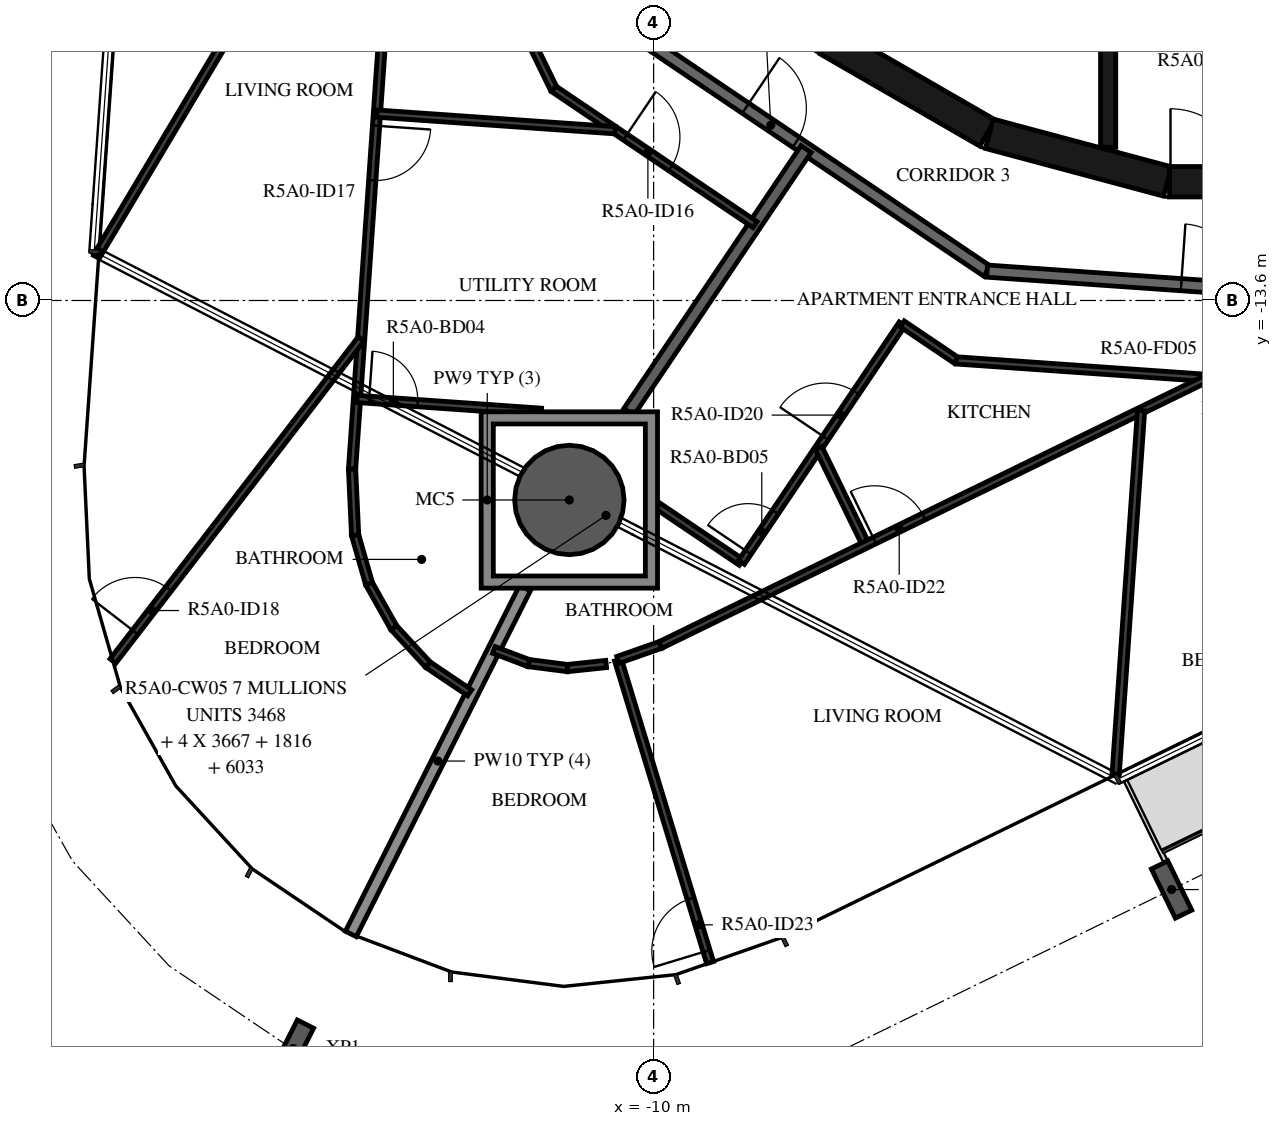
"""IFC4 building model, lengths in metres.
Left out: names, types, materials, properties, quantities, classifications, styles, units other than length and angle.
Written with IfcOpenShell. Run it as: python <this file> out.ifc"""

import sys

from ifc_helpers import new_model, si_unit, direction, frame, frame_2d, origin, origin_2d, place, context, subcontext, project, spatial, polyline, rectangle, hollow_circle, i_section, outline, extrude, element, fill, save


model = new_model("IFC4")
c1 = context("Model", 3, precision=1e-05, world=origin(), true_north=direction((0.0, 1.0)))
c2 = subcontext(c1, "Body", "Model", "MODEL_VIEW")
j1 = project(units=[si_unit("LENGTHUNIT", "METRE"), si_unit("PLANEANGLEUNIT", "RADIAN")], contexts=[c1])
p1 = place(None, origin())
s1 = spatial("IfcSite", under=j1, at=p1, CompositionType="ELEMENT")
p2 = place(p1, origin())
s2 = spatial("IfcBuilding", under=s1, at=p2, CompositionType="ELEMENT")
p3 = place(p2, frame((0.0, 0.0, 195.4)))
s3 = spatial("IfcBuildingStorey", under=s2, at=p3, CompositionType="ELEMENT", Elevation=195.4)
p4 = place(p3, frame((-11.386, -16.881, -0.38), z_axis=(0.0, 0.0, 1.0), x_axis=(1.0, 0.0, 0.0)))
e1 = element("IfcColumn", 1, at=p4, inside=s3, PredefinedType="COLUMN", context=c2, shape_type="SweptSolid", body=[
    extrude(hollow_circle(Radius=0.9, WallThickness=0.04, at=origin_2d()), origin(), (0.0, 0.0, 1.0), 3.5),
])
for number, where, z_axis, x_axis in (
    (2, (-15.928, -25.902, -0.38), (0.0, 0.0, 1.0), (-0.893, 0.45, 0.0)),
    (3, (-1.482, -23.287, -0.38), (0.0, 0.0, 1.0), (-0.899, -0.438, 0.0)),
):
    element("IfcColumn", number, at=place(p3, frame(where, z_axis=z_axis, x_axis=x_axis)), inside=s3, PredefinedType="COLUMN", context=c2, shape_type="SweptSolid", body=[
        extrude(i_section(OverallWidth=0.3, OverallDepth=0.9, WebThickness=0.019, FlangeThickness=0.035, FilletRadius=0.03, at=origin_2d()), origin(), (0.0, 0.0, 1.0), 3.5),
    ])
for number, where, z_axis, x_axis in (
    (4, (-7.137, -9.329, 0.0), (0.0, 0.0, 1.0), (0.866, -0.5, 0.0)),
    (5, (-4.479, -10.858, 0.0), (0.0, 0.0, 1.0), (0.966, -0.259, 0.0)),
):
    element("IfcWall", number, at=place(p3, frame(where, z_axis=z_axis, x_axis=x_axis)), inside=s3, PredefinedType="SHEAR", context=c2, shape_type="SweptSolid", body=[
        extrude(rectangle(XDim=3.033, YDim=0.5, at=frame_2d((1.516, 0.0))), origin(), (0.0, 0.0, 1.0), 3.12),
    ])
p5 = place(p3, frame((-1.516, -11.647, 0.0), z_axis=(0.0, 0.0, 1.0), x_axis=(1.0, 0.0, 0.0)))
e6 = element("IfcWall", 6, at=p5, inside=s3, PredefinedType="SHEAR", context=c2, shape_type="SweptSolid", body=[
    extrude(rectangle(XDim=3.033, YDim=0.5, at=frame_2d((1.516, 0.0))), origin(), (0.0, 0.0, 1.0), 3.12),
])
p6 = place(p5, frame((0.016, 0.0, 0.0)))
e7 = element("IfcOpeningElement", 7, at=p6, cuts=e6, PredefinedType="OPENING", context=c2, shape_type="SweptSolid", body=[
    extrude(rectangle(XDim=1.2, YDim=2.1, at=frame_2d((0.6, 1.05))), frame((0.0, 0.26, 0.0), z_axis=(0.0, -1.0, 0.0), x_axis=(1.0, 0.0, 0.0)), (0.0, 0.0, 1.0), 0.52),
])
p7 = place(p3, frame((-2.525, -8.97, 0.0), z_axis=(0.0, 0.0, 1.0), x_axis=(0.0, -1.0, 0.0)))
e8 = element("IfcWall", 8, at=p7, inside=s3, PredefinedType="SHEAR", context=c2, shape_type="SweptSolid", body=[
    extrude(rectangle(XDim=2.11, YDim=0.25, at=frame_2d((1.055, 0.0))), origin(), (0.0, 0.0, 1.0), 3.12),
])
p8 = place(p3, frame((-10.47, -9.101, 0.0), z_axis=(0.0, 0.0, 1.0), x_axis=(0.829035841718, -0.559195469534, 0.0)))
e9 = element("IfcWall", 9, at=p8, inside=s3, PredefinedType="STANDARD", context=c2, shape_type="SweptSolid", body=[
    extrude(rectangle(XDim=7.181, YDim=0.2, at=frame_2d((3.591, 0.0))), origin(), (0.0, 0.0, 1.0), 3.12),
])
p9 = place(p8, frame((2.39, 0.0, 0.0)))
e10 = element("IfcOpeningElement", 10, at=p9, cuts=e9, PredefinedType="OPENING", context=c2, shape_type="SweptSolid", body=[
    extrude(rectangle(XDim=1.0, YDim=2.1, at=frame_2d((0.5, 1.05))), frame((0.0, 0.11, 0.0), z_axis=(0.0, -1.0, 0.0), x_axis=(1.0, 0.0, 0.0)), (0.0, 0.0, 1.0), 0.22),
])
p10 = place(p3, frame((-4.517, -13.117, 0.0), z_axis=(0.0, 0.0, 1.0), x_axis=(0.997564669554, -0.069747616856, 0.0)))
e11 = element("IfcWall", 11, at=p10, inside=s3, PredefinedType="STANDARD", context=c2, shape_type="SweptSolid", body=[
    extrude(rectangle(XDim=6.885, YDim=0.2, at=frame_2d((3.443, 0.0))), origin(), (0.0, 0.0, 1.0), 3.12),
])
p11 = place(p10, frame((3.2, 0.0, 0.0)))
e12 = element("IfcOpeningElement", 12, at=p11, cuts=e11, PredefinedType="OPENING", context=c2, shape_type="SweptSolid", body=[
    extrude(rectangle(XDim=1.0, YDim=2.1, at=frame_2d((0.5, 1.05))), frame((0.0, 0.11, 0.0), z_axis=(0.0, -1.0, 0.0), x_axis=(1.0, 0.0, 0.0)), (0.0, 0.0, 1.0), 0.22),
])
p12 = place(p3, frame((-10.407, -15.43, 0.0), z_axis=(0.0, 0.0, 1.0), x_axis=(0.559038328133, 0.829141813973, 0.0)))
e13 = element("IfcWall", 13, at=p12, inside=s3, PredefinedType="STANDARD", context=c2, shape_type="SweptSolid", body=[
    extrude(rectangle(XDim=5.212, YDim=0.2, at=frame_2d((2.606, 0.0))), origin(), (0.0, 0.0, 1.0), 3.12),
])
p13 = place(p3, frame((-14.979, -24.017, 0.0), z_axis=(0.0, 0.0, 1.0), x_axis=(0.449711952388, 0.893173644864, 0.0)))
e14 = element("IfcWall", 14, at=p13, inside=s3, PredefinedType="STANDARD", context=c2, shape_type="SweptSolid", body=[
    extrude(rectangle(XDim=6.367, YDim=0.2, at=frame_2d((3.184, 0.0))), origin(), (0.0, 0.0, 1.0), 2.73),
])
p14 = place(p3, frame((-13.715, -5.87, 0.0), z_axis=(0.0, 0.0, 1.0), x_axis=(0.438372766482, -0.89879325632, 0.0)))
e15 = element("IfcWall", 15, at=p14, inside=s3, PredefinedType="PARTITIONING", context=c2, shape_type="SweptSolid", body=[
    extrude(rectangle(XDim=4.728, YDim=0.12, at=frame_2d((2.364, 0.0))), origin(), (0.0, 0.0, 1.0), 3.12),
])
p15 = place(p14, frame((0.4, 0.0, 0.0)))
e16 = element("IfcOpeningElement", 16, at=p15, cuts=e15, PredefinedType="OPENING", context=c2, shape_type="SweptSolid", body=[
    extrude(rectangle(XDim=0.9, YDim=2.1, at=frame_2d((0.45, 1.05))), frame((0.0, 0.07, 0.0), z_axis=(0.0, -1.0, 0.0), x_axis=(1.0, 0.0, 0.0)), (0.0, 0.0, 1.0), 0.14),
])
p16 = place(p3, frame((-11.642, -10.12, 0.0), z_axis=(0.0, 0.0, 1.0), x_axis=(0.829018066952, -0.559221820629, 0.0)))
e17 = element("IfcWall", 17, at=p16, inside=s3, PredefinedType="PARTITIONING", context=c2, shape_type="SweptSolid", body=[
    extrude(rectangle(XDim=3.992, YDim=0.12, at=frame_2d((1.996, 0.0))), origin(), (0.0, 0.0, 1.0), 3.12),
])
p17 = place(p16, frame((1.417, 0.0, 0.0)))
e18 = element("IfcOpeningElement", 18, at=p17, cuts=e17, PredefinedType="OPENING", context=c2, shape_type="SweptSolid", body=[
    extrude(rectangle(XDim=0.9, YDim=2.1, at=frame_2d((0.45, 1.05))), frame((0.0, 0.07, 0.0), z_axis=(0.0, -1.0, 0.0), x_axis=(1.0, 0.0, 0.0)), (0.0, 0.0, 1.0), 0.14),
])
p18 = place(p3, frame((-19.156, -12.863, 0.0), z_axis=(0.0, 0.0, 1.0), x_axis=(0.512316386407, 0.858796786335, 0.0)))
e19 = element("IfcWall", 19, at=p18, inside=s3, PredefinedType="PARTITIONING", context=c2, shape_type="SweptSolid", body=[
    extrude(rectangle(XDim=7.963, YDim=0.12, at=frame_2d((3.981, 0.0))), origin(), (0.0, 0.0, 1.0), 3.12),
])
p19 = place(p3, frame((-14.229, -5.929, 0.0), z_axis=(0.0, 0.0, 1.0), x_axis=(-0.069740723375, -0.997565151508, 0.0)))
e20 = element("IfcWall", 20, at=p19, inside=s3, PredefinedType="PARTITIONING", context=c2, shape_type="SweptSolid", body=[
    extrude(rectangle(XDim=10.47, YDim=0.12, at=frame_2d((5.235, 0.0))), origin(), (0.0, 0.0, 1.0), 3.12),
])
p20 = place(p19, frame((4.809, 0.0, 0.0)))
e21 = element("IfcOpeningElement", 21, at=p20, cuts=e20, PredefinedType="OPENING", context=c2, shape_type="SweptSolid", body=[
    extrude(rectangle(XDim=0.9, YDim=2.1, at=frame_2d((0.45, 1.05))), frame((0.0, 0.07, 0.0), z_axis=(0.0, -1.0, 0.0), x_axis=(1.0, 0.0, 0.0)), (0.0, 0.0, 1.0), 0.14),
])
p21 = place(p19, frame((1.0, 0.0, 0.0)))
e22 = element("IfcOpeningElement", 22, at=p21, cuts=e20, PredefinedType="OPENING", context=c2, shape_type="SweptSolid", body=[
    extrude(rectangle(XDim=0.9, YDim=2.1, at=frame_2d((0.45, 1.05))), frame((0.0, 0.07, 0.0), z_axis=(0.0, -1.0, 0.0), x_axis=(1.0, 0.0, 0.0)), (0.0, 0.0, 1.0), 0.14),
])
p22 = place(p3, frame((-14.551, -10.527, 0.0), z_axis=(0.0, 0.0, 1.0), x_axis=(0.997564247633, -0.069753651118, 0.0)))
e23 = element("IfcWall", 23, at=p22, inside=s3, PredefinedType="PARTITIONING", context=c2, shape_type="SweptSolid", body=[
    extrude(rectangle(XDim=3.927, YDim=0.12, at=frame_2d((1.963, 0.0))), origin(), (0.0, 0.0, 1.0), 3.12),
])
p23 = place(p3, frame((-18.892, -19.531, 0.0), z_axis=(0.0, 0.0, 1.0), x_axis=(0.610326128317, 0.792150249065, 0.0)))
e24 = element("IfcWall", 24, at=p23, inside=s3, PredefinedType="PARTITIONING", context=c2, shape_type="SweptSolid", body=[
    extrude(rectangle(XDim=6.689, YDim=0.12, at=frame_2d((3.345, 0.0))), origin(), (0.0, 0.0, 1.0), 3.12),
])
p24 = place(p23, frame((0.6, 0.0, 0.0)))
e25 = element("IfcOpeningElement", 25, at=p24, cuts=e24, PredefinedType="OPENING", context=c2, shape_type="SweptSolid", body=[
    extrude(rectangle(XDim=0.9, YDim=2.1, at=frame_2d((0.45, 1.05))), frame((0.0, 0.07, 0.0), z_axis=(0.0, -1.0, 0.0), x_axis=(1.0, 0.0, 0.0)), (0.0, 0.0, 1.0), 0.14),
])
p25 = place(p3, frame((-14.879, -15.219, 0.0), z_axis=(0.0, 0.0, 1.0), x_axis=(0.997566012813, -0.069728402248, 0.0)))
e26 = element("IfcWall", 26, at=p25, inside=s3, PredefinedType="PARTITIONING", context=c2, shape_type="SweptSolid", body=[
    extrude(rectangle(XDim=3.039, YDim=0.12, at=frame_2d((1.52, 0.0))), origin(), (0.0, 0.0, 1.0), 3.12),
])
p26 = place(p25, frame((0.2, 0.0, 0.0)))
e27 = element("IfcOpeningElement", 27, at=p26, cuts=e26, PredefinedType="OPENING", context=c2, shape_type="SweptSolid", body=[
    extrude(rectangle(XDim=0.8, YDim=2.1, at=frame_2d((0.4, 1.05))), frame((0.0, 0.07, 0.0), z_axis=(0.0, -1.0, 0.0), x_axis=(1.0, 0.0, 0.0)), (0.0, 0.0, 1.0), 0.14),
])
for number, where, z_axis, x_axis in (
    (28, (-13.025, -20.052, 0.0), (0.0, 0.0, 1.0), (-0.829, 0.559, 0.0)),
    (29, (-13.712, -19.588, 0.0), (0.0, 0.0, 1.0), (-0.678, 0.735, 0.0)),
):
    element("IfcWall", number, at=place(p3, frame(where, z_axis=z_axis, x_axis=x_axis)), inside=s3, PredefinedType="PARTITIONING", context=c2, shape_type="SweptSolid", body=[
        extrude(rectangle(XDim=0.829, YDim=0.12, at=frame_2d((0.415, 0.0))), origin(), (0.0, 0.0, 1.0), 3.12),
    ])
p27 = place(p3, frame((-14.274, -18.979, 0.0), z_axis=(0.0, 0.0, 1.0), x_axis=(-0.490037513137, 0.871701345484, 0.0)))
e30 = element("IfcWall", 30, at=p27, inside=s3, PredefinedType="PARTITIONING", context=c2, shape_type="SweptSolid", body=[
    extrude(rectangle(XDim=0.829, YDim=0.12, at=frame_2d((0.415, 0.0))), origin(), (0.0, 0.0, 1.0), 3.12),
])
p28 = place(p3, frame((-14.68, -18.256, 0.0), z_axis=(0.0, 0.0, 1.0), x_axis=(-0.275382358468, 0.961334778651, 0.0)))
e31 = element("IfcWall", 31, at=p28, inside=s3, PredefinedType="PARTITIONING", context=c2, shape_type="SweptSolid", body=[
    extrude(rectangle(XDim=0.829, YDim=0.12, at=frame_2d((0.415, 0.0))), origin(), (0.0, 0.0, 1.0), 3.12),
])
p29 = place(p3, frame((-14.909, -17.459, 0.0), z_axis=(0.0, 0.0, 1.0), x_axis=(-0.046497887649, 0.99891838828, 0.0)))
e32 = element("IfcWall", 32, at=p29, inside=s3, PredefinedType="PARTITIONING", context=c2, shape_type="SweptSolid", body=[
    extrude(rectangle(XDim=1.087, YDim=0.12, at=frame_2d((0.543, 0.0))), origin(), (0.0, 0.0, 1.0), 3.12),
])
p30 = place(p3, frame((-9.936, -16.976, 0.0), z_axis=(0.0, 0.0, 1.0), x_axis=(0.829057888835, -0.559162782167, 0.0)))
e33 = element("IfcWall", 33, at=p30, inside=s3, PredefinedType="PARTITIONING", context=c2, shape_type="SweptSolid", body=[
    extrude(rectangle(XDim=1.664, YDim=0.12, at=frame_2d((0.832, 0.0))), origin(), (0.0, 0.0, 1.0), 3.12),
])
p31 = place(p3, frame((-8.557, -17.906, 0.0), z_axis=(0.0, 0.0, 1.0), x_axis=(0.559194471553, 0.829036514868, 0.0)))
e34 = element("IfcWall", 34, at=p31, inside=s3, PredefinedType="PARTITIONING", context=c2, shape_type="SweptSolid", body=[
    extrude(rectangle(XDim=4.73, YDim=0.12, at=frame_2d((2.365, 0.0))), origin(), (0.0, 0.0, 1.0), 3.12),
])
p32 = place(p31, frame((0.2, 0.0, 0.0)))
e35 = element("IfcOpeningElement", 35, at=p32, cuts=e34, PredefinedType="OPENING", context=c2, shape_type="SweptSolid", body=[
    extrude(rectangle(XDim=0.8, YDim=2.1, at=frame_2d((0.4, 1.05))), frame((0.0, 0.07, 0.0), z_axis=(0.0, -1.0, 0.0), x_axis=(1.0, 0.0, 0.0)), (0.0, 0.0, 1.0), 0.14),
])
p33 = place(p31, frame((2.471, 0.0, 0.0)))
e36 = element("IfcOpeningElement", 36, at=p33, cuts=e34, PredefinedType="OPENING", context=c2, shape_type="SweptSolid", body=[
    extrude(rectangle(XDim=0.9, YDim=2.1, at=frame_2d((0.45, 1.05))), frame((0.0, 0.07, 0.0), z_axis=(0.0, -1.0, 0.0), x_axis=(1.0, 0.0, 0.0)), (0.0, 0.0, 1.0), 0.14),
])
p34 = place(p3, frame((-5.912, -13.985, 0.0), z_axis=(0.0, 0.0, 1.0), x_axis=(0.829027978444, -0.559207127062, 0.0)))
e37 = element("IfcWall", 37, at=p34, inside=s3, PredefinedType="PARTITIONING", context=c2, shape_type="SweptSolid", body=[
    extrude(rectangle(XDim=1.073, YDim=0.12, at=frame_2d((0.537, 0.0))), origin(), (0.0, 0.0, 1.0), 3.12),
])
p35 = place(p3, frame((-5.022, -14.585, 0.0), z_axis=(0.0, 0.0, 1.0), x_axis=(0.997565118395, -0.069741197017, 0.0)))
e38 = element("IfcWall", 38, at=p35, inside=s3, PredefinedType="PARTITIONING", context=c2, shape_type="SweptSolid", body=[
    extrude(rectangle(XDim=7.985, YDim=0.12, at=frame_2d((3.993, 0.0))), origin(), (0.0, 0.0, 1.0), 3.12),
])
p36 = place(p35, frame((4.346, 0.0, 0.0)))
e39 = element("IfcOpeningElement", 39, at=p36, cuts=e38, PredefinedType="OPENING", context=c2, shape_type="SweptSolid", body=[
    extrude(rectangle(XDim=0.9, YDim=2.1, at=frame_2d((0.45, 1.05))), frame((0.0, 0.07, 0.0), z_axis=(0.0, -1.0, 0.0), x_axis=(1.0, 0.0, 0.0)), (0.0, 0.0, 1.0), 0.14),
])
p37 = place(p3, frame((-10.78, -19.578, 0.0), z_axis=(0.0, 0.0, 1.0), x_axis=(-0.994515867502, -0.104585798686, 0.0)))
e40 = element("IfcWall", 40, at=p37, inside=s3, PredefinedType="PARTITIONING", context=c2, shape_type="SweptSolid", body=[
    extrude(rectangle(XDim=0.642, YDim=0.12, at=frame_2d((0.321, 0.0))), origin(), (0.0, 0.0, 1.0), 3.12),
])
p38 = place(p3, frame((-11.418, -19.645, 0.0), z_axis=(0.0, 0.0, 1.0), x_axis=(-0.991802759529, 0.127778269633, 0.0)))
e41 = element("IfcWall", 41, at=p38, inside=s3, PredefinedType="PARTITIONING", context=c2, shape_type="SweptSolid", body=[
    extrude(rectangle(XDim=0.642, YDim=0.12, at=frame_2d((0.321, 0.0))), origin(), (0.0, 0.0, 1.0), 3.12),
])
p39 = place(p3, frame((-12.055, -19.563, 0.0), z_axis=(0.0, 0.0, 1.0), x_axis=(-0.935507243946, 0.353307509862, 0.0)))
e42 = element("IfcWall", 42, at=p39, inside=s3, PredefinedType="PARTITIONING", context=c2, shape_type="SweptSolid", body=[
    extrude(rectangle(XDim=0.612, YDim=0.12, at=frame_2d((0.306, 0.0))), origin(), (0.0, 0.0, 1.0), 3.12),
])
p40 = place(p3, frame((-9.072, -24.489, 0.0), z_axis=(0.0, 0.0, 1.0), x_axis=(-0.291025348593, 0.956715342449, 0.0)))
e43 = element("IfcWall", 43, at=p40, inside=s3, PredefinedType="PARTITIONING", context=c2, shape_type="SweptSolid", body=[
    extrude(rectangle(XDim=5.205, YDim=0.12, at=frame_2d((2.602, 0.0))), origin(), (0.0, 0.0, 1.0), 3.12),
])
p41 = place(p40, frame((0.2, 0.0, 0.0)))
e44 = element("IfcOpeningElement", 44, at=p41, cuts=e43, PredefinedType="OPENING", context=c2, shape_type="SweptSolid", body=[
    extrude(rectangle(XDim=0.9, YDim=2.1, at=frame_2d((0.45, 1.05))), frame((0.0, 0.07, 0.0), z_axis=(0.0, -1.0, 0.0), x_axis=(1.0, 0.0, 0.0)), (0.0, 0.0, 1.0), 0.14),
])
p42 = place(p3, frame((-6.51, -17.617, 0.0), z_axis=(0.0, 0.0, 1.0), x_axis=(-0.438380229518, 0.898789616299, 0.0)))
e45 = element("IfcWall", 45, at=p42, inside=s3, PredefinedType="PARTITIONING", context=c2, shape_type="SweptSolid", body=[
    extrude(rectangle(XDim=1.773, YDim=0.12, at=frame_2d((0.887, 0.0))), origin(), (0.0, 0.0, 1.0), 3.12),
])
p43 = place(p3, frame((-10.586, -19.51, 0.0), z_axis=(0.0, 0.0, 1.0), x_axis=(0.943560277016, 0.3312008509, 0.0)))
e46 = element("IfcWall", 46, at=p43, inside=s3, PredefinedType="PARTITIONING", context=c2, shape_type="SweptSolid", body=[
    extrude(rectangle(XDim=0.741, YDim=0.12, at=frame_2d((0.371, 0.0))), origin(), (0.0, 0.0, 1.0), 3.12),
])
p44 = place(p3, frame((-9.886, -19.264, 0.0), z_axis=(0.0, 0.0, 1.0), x_axis=(0.898796326112, 0.43836647245, 0.0)))
e47 = element("IfcWall", 47, at=p44, inside=s3, PredefinedType="PARTITIONING", context=c2, shape_type="SweptSolid", body=[
    extrude(rectangle(XDim=10.014, YDim=0.12, at=frame_2d((5.007, 0.0))), origin(), (0.0, 0.0, 1.0), 3.12),
])
p45 = place(p44, frame((3.917, 0.0, 0.0)))
e48 = element("IfcOpeningElement", 48, at=p45, cuts=e47, PredefinedType="OPENING", context=c2, shape_type="SweptSolid", body=[
    extrude(rectangle(XDim=0.9, YDim=2.1, at=frame_2d((0.45, 1.05))), frame((0.0, 0.07, 0.0), z_axis=(0.0, -1.0, 0.0), x_axis=(1.0, 0.0, 0.0)), (0.0, 0.0, 1.0), 0.14),
])
p46 = place(p3, frame((-2.403, -21.4, 0.0), z_axis=(0.0, 0.0, 1.0), x_axis=(0.069729998801, 0.997565901215, 0.0)))
e49 = element("IfcWall", 49, at=p46, inside=s3, PredefinedType="PARTITIONING", context=c2, shape_type="SweptSolid", body=[
    extrude(rectangle(XDim=6.005, YDim=0.12, at=frame_2d((3.002, 0.0))), origin(), (0.0, 0.0, 1.0), 3.12),
])
p47 = place(p3, origin())
e50 = element("IfcWall", 50, at=p47, inside=s3, PredefinedType="STANDARD", context=c2, shape_type="SweptSolid", body=[
    extrude(outline(polyline([(-9.936, -15.43), (-9.936, -18.331), (-12.836, -18.331), (-12.836, -15.43), (-9.936, -15.43)]), holes=[polyline([(-12.636, -18.131), (-10.136, -18.131), (-10.136, -15.631), (-12.636, -15.631), (-12.636, -18.131)])]), origin(), (0.0, 0.0, 1.0), 3.12),
])
p48 = place(p6, origin())
e51 = element("IfcDoor", 51, at=p48, inside=s3, OperationType="SINGLE_SWING_RIGHT", PredefinedType="DOOR", context=c2, shape_type="SweptSolid", body=[
    extrude(rectangle(XDim=1.2, YDim=2.1, at=frame_2d((0.6, 1.05))), frame((0.0, 0.025, 0.0), z_axis=(0.0, -1.0, 0.0), x_axis=(1.0, 0.0, 0.0)), (0.0, 0.0, 1.0), 0.05),
])
fill(e7, e51)
p49 = place(p9, origin())
e52 = element("IfcDoor", 52, at=p49, inside=s3, OperationType="SINGLE_SWING_RIGHT", PredefinedType="DOOR", context=c2, shape_type="SweptSolid", body=[
    extrude(rectangle(XDim=1.0, YDim=2.1, at=frame_2d((0.5, 1.05))), frame((0.0, 0.025, 0.0), z_axis=(0.0, -1.0, 0.0), x_axis=(1.0, 0.0, 0.0)), (0.0, 0.0, 1.0), 0.05),
])
fill(e10, e52)
p50 = place(p17, origin())
e53 = element("IfcDoor", 53, at=p50, inside=s3, OperationType="SINGLE_SWING_RIGHT", PredefinedType="DOOR", context=c2, shape_type="SweptSolid", body=[
    extrude(rectangle(XDim=0.9, YDim=2.1, at=frame_2d((0.45, 1.05))), frame((0.0, 0.025, 0.0), z_axis=(0.0, -1.0, 0.0), x_axis=(1.0, 0.0, 0.0)), (0.0, 0.0, 1.0), 0.05),
])
fill(e18, e53)
p51 = place(p20, origin())
e54 = element("IfcDoor", 54, at=p51, inside=s3, OperationType="SINGLE_SWING_RIGHT", PredefinedType="DOOR", context=c2, shape_type="SweptSolid", body=[
    extrude(rectangle(XDim=0.9, YDim=2.1, at=frame_2d((0.45, 1.05))), frame((0.0, 0.025, 0.0), z_axis=(0.0, -1.0, 0.0), x_axis=(1.0, 0.0, 0.0)), (0.0, 0.0, 1.0), 0.05),
])
fill(e21, e54)
p52 = place(p26, origin())
e55 = element("IfcDoor", 55, at=p52, inside=s3, OperationType="SINGLE_SWING_RIGHT", PredefinedType="DOOR", context=c2, shape_type="SweptSolid", body=[
    extrude(rectangle(XDim=0.8, YDim=2.1, at=frame_2d((0.4, 1.05))), frame((0.0, 0.025, 0.0), z_axis=(0.0, -1.0, 0.0), x_axis=(1.0, 0.0, 0.0)), (0.0, 0.0, 1.0), 0.05),
])
fill(e27, e55)
p53 = place(p24, origin())
e56 = element("IfcDoor", 56, at=p53, inside=s3, OperationType="SINGLE_SWING_RIGHT", PredefinedType="DOOR", context=c2, shape_type="SweptSolid", body=[
    extrude(rectangle(XDim=0.9, YDim=2.1, at=frame_2d((0.45, 1.05))), frame((0.0, 0.025, 0.0), z_axis=(0.0, -1.0, 0.0), x_axis=(1.0, 0.0, 0.0)), (0.0, 0.0, 1.0), 0.05),
])
fill(e25, e56)
p54 = place(p11, origin())
e57 = element("IfcDoor", 57, at=p54, inside=s3, OperationType="SINGLE_SWING_LEFT", PredefinedType="DOOR", context=c2, shape_type="SweptSolid", body=[
    extrude(rectangle(XDim=1.0, YDim=2.1, at=frame_2d((0.5, 1.05))), frame((0.0, 0.025, 0.0), z_axis=(0.0, -1.0, 0.0), x_axis=(1.0, 0.0, 0.0)), (0.0, 0.0, 1.0), 0.05),
])
fill(e12, e57)
p55 = place(p32, origin())
e58 = element("IfcDoor", 58, at=p55, inside=s3, OperationType="SINGLE_SWING_LEFT", PredefinedType="DOOR", context=c2, shape_type="SweptSolid", body=[
    extrude(rectangle(XDim=0.8, YDim=2.1, at=frame_2d((0.4, 1.05))), frame((0.0, 0.025, 0.0), z_axis=(0.0, -1.0, 0.0), x_axis=(1.0, 0.0, 0.0)), (0.0, 0.0, 1.0), 0.05),
])
fill(e35, e58)
p56 = place(p33, origin())
e59 = element("IfcDoor", 59, at=p56, inside=s3, OperationType="SINGLE_SWING_LEFT", PredefinedType="DOOR", context=c2, shape_type="SweptSolid", body=[
    extrude(rectangle(XDim=0.9, YDim=2.1, at=frame_2d((0.45, 1.05))), frame((0.0, 0.025, 0.0), z_axis=(0.0, -1.0, 0.0), x_axis=(1.0, 0.0, 0.0)), (0.0, 0.0, 1.0), 0.05),
])
fill(e36, e59)
p57 = place(p45, origin())
e60 = element("IfcDoor", 60, at=p57, inside=s3, OperationType="SINGLE_SWING_LEFT", PredefinedType="DOOR", context=c2, shape_type="SweptSolid", body=[
    extrude(rectangle(XDim=0.9, YDim=2.1, at=frame_2d((0.45, 1.05))), frame((0.0, 0.025, 0.0), z_axis=(0.0, -1.0, 0.0), x_axis=(1.0, 0.0, 0.0)), (0.0, 0.0, 1.0), 0.05),
])
fill(e48, e60)
p58 = place(p41, origin())
e61 = element("IfcDoor", 61, at=p58, inside=s3, OperationType="SINGLE_SWING_LEFT", PredefinedType="DOOR", context=c2, shape_type="SweptSolid", body=[
    extrude(rectangle(XDim=0.9, YDim=2.1, at=frame_2d((0.45, 1.05))), frame((0.0, 0.025, 0.0), z_axis=(0.0, -1.0, 0.0), x_axis=(1.0, 0.0, 0.0)), (0.0, 0.0, 1.0), 0.05),
])
fill(e44, e61)
save(model, sys.argv[1])
